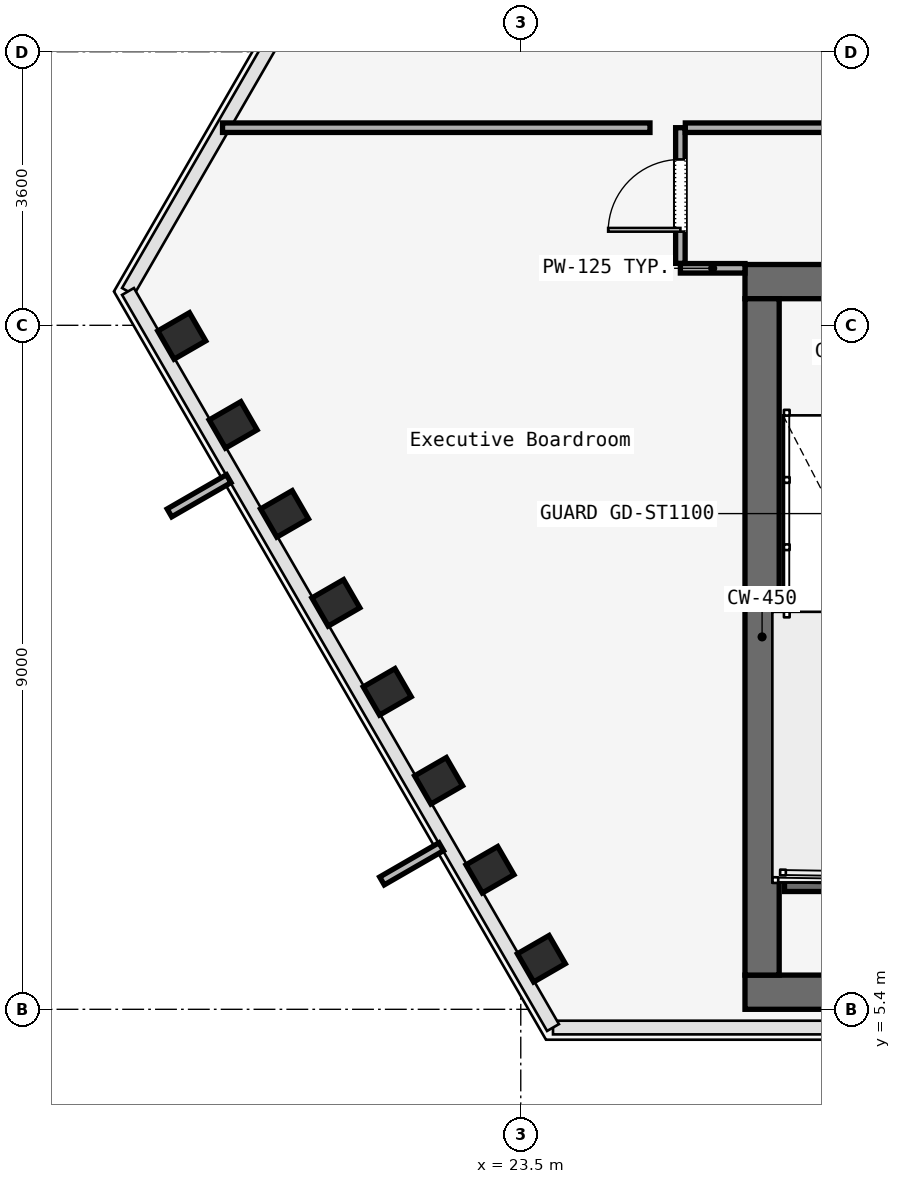
"""IFC4 building model, lengths in metres.
Left out: names, types, materials, properties, quantities, classifications, styles, units other than length and angle.
Written with IfcOpenShell. Run it as: python <this file> out.ifc"""

import sys

from ifc_helpers import new_model, si_unit, direction, frame, frame_2d, origin, origin_2d, place, context, subcontext, project, spatial, rectangle, i_section, extrude, element, fill, save


model = new_model("IFC4")
c1 = context("Model", 3, precision=1e-05, world=origin(), true_north=direction((0.0, 1.0)))
c2 = subcontext(c1, "Body", "Model", "MODEL_VIEW")
j1 = project(units=[si_unit("LENGTHUNIT", "METRE"), si_unit("PLANEANGLEUNIT", "RADIAN")], contexts=[c1])
p1 = place(None, origin())
s1 = spatial("IfcSite", under=j1, at=p1, CompositionType="ELEMENT")
p2 = place(p1, origin())
s2 = spatial("IfcBuilding", under=s1, at=p2, CompositionType="ELEMENT")
p3 = place(p2, frame((0.0, 0.0, 149.8)))
s3 = spatial("IfcBuildingStorey", under=s2, at=p3, CompositionType="ELEMENT", Elevation=149.8)
p4 = place(p3, frame((26.45, 14.975, 0.0), z_axis=(0.0, 0.0, 1.0), x_axis=(1.0, 0.0, 0.0)))
e1 = element("IfcWall", 1, at=p4, inside=s3, PredefinedType="SOLIDWALL", context=c2, shape_type="SweptSolid", body=[
    extrude(rectangle(XDim=31.1, YDim=0.45, at=frame_2d((15.55, 0.0))), origin(), (0.0, 0.0, 1.0), 3.58),
])
p5 = place(p4, frame((1.65, 0.0, 0.0)))
e2 = element("IfcOpeningElement", 2, at=p5, cuts=e1, PredefinedType="OPENING", context=c2, shape_type="SweptSolid", body=[
    extrude(rectangle(XDim=1.1, YDim=2.2, at=frame_2d((0.55, 1.1))), frame((0.0, 0.225, 0.0), z_axis=(0.0, -1.0, 0.0), x_axis=(1.0, 0.0, 0.0)), (0.0, 0.0, 1.0), 0.45),
])
p6 = place(p4, frame((13.65, 0.0, 0.0)))
e3 = element("IfcOpeningElement", 3, at=p6, cuts=e1, PredefinedType="OPENING", context=c2, shape_type="SweptSolid", body=[
    extrude(rectangle(XDim=1.1, YDim=2.2, at=frame_2d((0.55, 1.1))), frame((0.0, 0.225, 0.0), z_axis=(0.0, -1.0, 0.0), x_axis=(1.0, 0.0, 0.0)), (0.0, 0.0, 1.0), 0.45),
])
p7 = place(p4, frame((25.55, 0.0, 0.0)))
e4 = element("IfcOpeningElement", 4, at=p7, cuts=e1, PredefinedType="OPENING", context=c2, shape_type="SweptSolid", body=[
    extrude(rectangle(XDim=1.1, YDim=2.2, at=frame_2d((0.55, 1.1))), frame((0.0, 0.225, 0.0), z_axis=(0.0, -1.0, 0.0), x_axis=(1.0, 0.0, 0.0)), (0.0, 0.0, 1.0), 0.45),
])
p8 = place(p4, frame((10.7, 0.0, 0.0)))
e5 = element("IfcOpeningElement", 5, at=p8, cuts=e1, PredefinedType="OPENING", context=c2, shape_type="SweptSolid", body=[
    extrude(rectangle(XDim=1.4, YDim=2.2, at=frame_2d((0.7, 1.1))), frame((0.0, 0.225, 0.0), z_axis=(0.0, -1.0, 0.0), x_axis=(1.0, 0.0, 0.0)), (0.0, 0.0, 1.0), 0.45),
])
p9 = place(p4, frame((19.35, 0.0, 0.0)))
e6 = element("IfcOpeningElement", 6, at=p9, cuts=e1, PredefinedType="OPENING", context=c2, shape_type="SweptSolid", body=[
    extrude(rectangle(XDim=1.1, YDim=2.2, at=frame_2d((0.55, 1.1))), frame((0.0, 0.225, 0.0), z_axis=(0.0, -1.0, 0.0), x_axis=(1.0, 0.0, 0.0)), (0.0, 0.0, 1.0), 0.45),
])
p10 = place(p4, frame((21.4, 0.0, 0.0)))
e7 = element("IfcOpeningElement", 7, at=p10, cuts=e1, PredefinedType="OPENING", context=c2, shape_type="SweptSolid", body=[
    extrude(rectangle(XDim=0.9, YDim=2.1, at=frame_2d((0.45, 1.05))), frame((0.0, 0.225, 0.0), z_axis=(0.0, -1.0, 0.0), x_axis=(1.0, 0.0, 0.0)), (0.0, 0.0, 1.0), 0.45),
])
p11 = place(p4, frame((23.35, 0.0, 0.0)))
e8 = element("IfcOpeningElement", 8, at=p11, cuts=e1, PredefinedType="OPENING", context=c2, shape_type="SweptSolid", body=[
    extrude(rectangle(XDim=1.3, YDim=2.3, at=frame_2d((0.65, 1.15))), frame((0.0, 0.225, 0.0), z_axis=(0.0, -1.0, 0.0), x_axis=(1.0, 0.0, 0.0)), (0.0, 0.0, 1.0), 0.45),
])
p12 = place(p3, frame((26.45, 5.625, 0.0), z_axis=(0.0, 0.0, 1.0), x_axis=(1.0, 0.0, 0.0)))
e9 = element("IfcWall", 9, at=p12, inside=s3, PredefinedType="SOLIDWALL", context=c2, shape_type="SweptSolid", body=[
    extrude(rectangle(XDim=31.1, YDim=0.45, at=frame_2d((15.55, 0.0))), origin(), (0.0, 0.0, 1.0), 3.58),
])
p13 = place(p3, frame((26.675, 5.85, 0.0), z_axis=(0.0, 0.0, 1.0), x_axis=(0.0, 1.0, 0.0)))
e10 = element("IfcWall", 10, at=p13, inside=s3, PredefinedType="SOLIDWALL", context=c2, shape_type="SweptSolid", body=[
    extrude(rectangle(XDim=8.9, YDim=0.45, at=frame_2d((4.45, 0.0))), origin(), (0.0, 0.0, 1.0), 3.58),
])
for number, where, z_axis, x_axis in (
    (11, (19.04, 14.26, 0.0), (0.0, 0.0, 1.0), (-0.5, 0.866, 0.0)),
    (12, (19.716, 13.089, 0.0), (0.0, 0.0, 1.0), (-0.5, 0.866, 0.0)),
    (13, (20.392, 11.919, 0.0), (0.0, 0.0, 1.0), (-0.5, 0.866, 0.0)),
    (14, (21.067, 10.748, 0.0), (0.0, 0.0, 1.0), (-0.5, 0.866, 0.0)),
    (15, (21.743, 9.577, 0.0), (0.0, 0.0, 1.0), (-0.5, 0.866, 0.0)),
    (16, (22.419, 8.407, 0.0), (0.0, 0.0, 1.0), (-0.5, 0.866, 0.0)),
    (17, (23.095, 7.236, 0.0), (0.0, 0.0, 1.0), (-0.5, 0.866, 0.0)),
    (18, (23.771, 6.065, 0.0), (0.0, 0.0, 1.0), (-0.5, 0.866, 0.0)),
):
    element("IfcColumn", number, at=place(p3, frame(where, z_axis=z_axis, x_axis=x_axis)), inside=s3, PredefinedType="COLUMN", context=c2, shape_type="SweptSolid", body=[
        extrude(i_section(OverallWidth=0.428, OverallDepth=0.481, WebThickness=0.051, FlangeThickness=0.065, FilletRadius=0.015, at=origin_2d()), origin(), (0.0, 0.0, 1.0), 3.58),
    ])
p14 = place(p3, frame((26.97, 7.05, 0.0), z_axis=(0.0, 0.0, 1.0), x_axis=(1.0, 0.0, 0.0)))
e19 = element("IfcWall", 19, at=p14, inside=s3, PredefinedType="SOLIDWALL", context=c2, shape_type="SweptSolid", body=[
    extrude(rectangle(XDim=3.115, YDim=0.2, at=frame_2d((1.558, 0.0))), origin(), (0.0, 0.0, 1.0), 3.8),
])
p15 = place(p3, frame((26.45, 15.15, 0.0), z_axis=(0.0, 0.0, 1.0), x_axis=(-1.0, 0.0, 0.0)))
e20 = element("IfcWall", 20, at=p15, inside=s3, PredefinedType="PARTITIONING", context=c2, shape_type="SweptSolid", body=[
    extrude(rectangle(XDim=0.85, YDim=0.125, at=frame_2d((0.425, 0.0))), origin(), (0.0, 0.0, 1.0), 3.01),
])
p16 = place(p3, frame((25.6, 15.215, 0.0), z_axis=(0.0, 0.0, 1.0), x_axis=(0.0, 1.0, 0.0)))
e21 = element("IfcWall", 21, at=p16, inside=s3, PredefinedType="PARTITIONING", context=c2, shape_type="SweptSolid", body=[
    extrude(rectangle(XDim=1.785, YDim=0.125, at=frame_2d((0.893, 0.0))), origin(), (0.0, 0.0, 1.0), 3.01),
])
p17 = place(p16, frame((0.417, 0.0, 0.0)))
e22 = element("IfcOpeningElement", 22, at=p17, cuts=e21, PredefinedType="OPENING", context=c2, shape_type="SweptSolid", body=[
    extrude(rectangle(XDim=0.95, YDim=2.2, at=frame_2d((0.475, 1.1))), frame((0.0, 0.062, 0.0), z_axis=(0.0, -1.0, 0.0), x_axis=(1.0, 0.0, 0.0)), (0.0, 0.0, 1.0), 0.125),
])
p18 = place(p3, frame((25.665, 17.0, 0.0), z_axis=(0.0, 0.0, 1.0), x_axis=(1.0, 0.0, 0.0)))
e23 = element("IfcWall", 23, at=p18, inside=s3, PredefinedType="PARTITIONING", context=c2, shape_type="SweptSolid", body=[
    extrude(rectangle(XDim=5.735, YDim=0.125, at=frame_2d((2.867, 0.0))), origin(), (0.0, 0.0, 1.0), 3.01),
])
p19 = place(p18, frame((2.167, 0.0, 0.0)))
e24 = element("IfcOpeningElement", 24, at=p19, cuts=e23, PredefinedType="OPENING", context=c2, shape_type="SweptSolid", body=[
    extrude(rectangle(XDim=1.4, YDim=2.2, at=frame_2d((0.7, 1.1))), frame((0.0, 0.062, 0.0), z_axis=(0.0, -1.0, 0.0), x_axis=(1.0, 0.0, 0.0)), (0.0, 0.0, 1.0), 0.125),
])
p20 = place(p3, frame((19.576, 17.0, 0.0), z_axis=(0.0, 0.0, 1.0), x_axis=(1.0, 0.0, 0.0)))
e25 = element("IfcWall", 25, at=p20, inside=s3, PredefinedType="PARTITIONING", context=c2, shape_type="SweptSolid", body=[
    extrude(rectangle(XDim=5.624, YDim=0.125, at=frame_2d((2.812, 0.0))), origin(), (0.0, 0.0, 1.0), 3.01),
])
p21 = place(p17, origin())
e26 = element("IfcDoor", 26, at=p21, inside=s3, OperationType="SINGLE_SWING_RIGHT", PredefinedType="DOOR", context=c2, shape_type="SweptSolid", body=[
    extrude(rectangle(XDim=0.95, YDim=2.2, at=frame_2d((0.475, 1.1))), frame((0.0, 0.025, 0.0), z_axis=(0.0, -1.0, 0.0), x_axis=(1.0, 0.0, 0.0)), (0.0, 0.0, 1.0), 0.05),
])
fill(e22, e26)
save(model, sys.argv[1])
